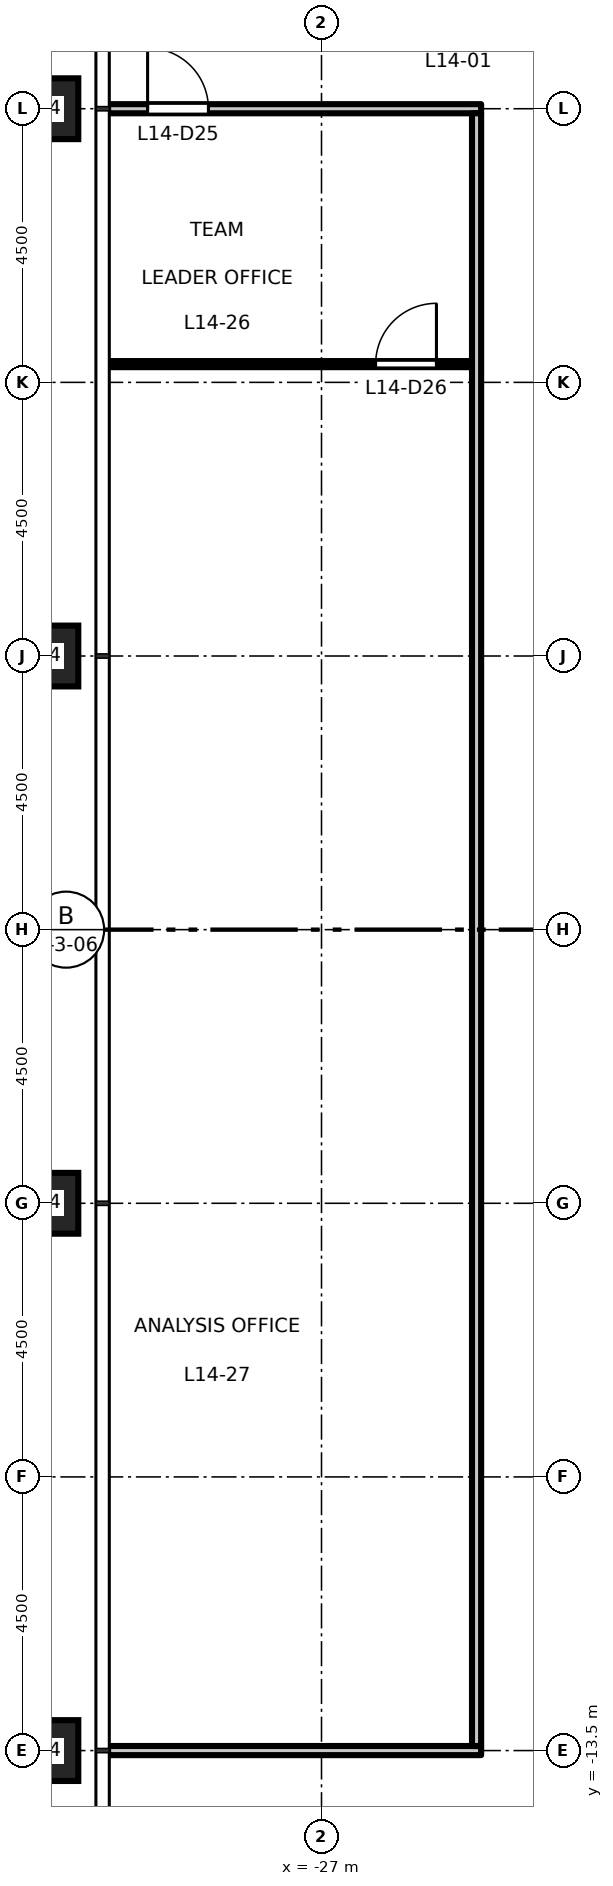
"""IFC4 building model, lengths in metres.
Left out: names, types, materials, properties, quantities, classifications, styles, units other than length and angle.
Written with IfcOpenShell. Run it as: python <this file> out.ifc"""

import sys

from ifc_helpers import new_model, si_unit, direction, frame, frame_2d, origin, origin_2d, place, context, subcontext, project, spatial, rectangle, hollow_rectangle, extrude, element, fill, save


model = new_model("IFC4")
c1 = context("Model", 3, precision=1e-05, world=origin(), true_north=direction((0.0, 1.0)))
c2 = subcontext(c1, "Body", "Model", "MODEL_VIEW")
j1 = project(units=[si_unit("LENGTHUNIT", "METRE"), si_unit("PLANEANGLEUNIT", "RADIAN")], contexts=[c1])
p1 = place(None, origin())
s1 = spatial("IfcSite", under=j1, at=p1, CompositionType="ELEMENT")
p2 = place(p1, origin())
s2 = spatial("IfcBuilding", under=s1, at=p2, CompositionType="ELEMENT")
p3 = place(p2, frame((0.0, 0.0, 67.2)))
s3 = spatial("IfcBuildingStorey", under=s2, at=p3, CompositionType="ELEMENT", Elevation=67.2)
for number, where, z_axis, x_axis in (
    (1, (-31.5, 13.5, 0.0), (0.0, 0.0, 1.0), (1.0, 0.0, 0.0)),
    (2, (-31.5, 4.5, 0.0), (0.0, 0.0, 1.0), (1.0, 0.0, 0.0)),
    (3, (-31.5, -4.5, 0.0), (0.0, 0.0, 1.0), (1.0, 0.0, 0.0)),
    (4, (-31.5, -13.5, 0.0), (0.0, 0.0, 1.0), (1.0, 0.0, 0.0)),
):
    element("IfcColumn", number, at=place(p3, frame(where, z_axis=z_axis, x_axis=x_axis)), inside=s3, PredefinedType="COLUMN", context=c2, shape_type="SweptSolid", body=[
        extrude(hollow_rectangle(XDim=1.0, YDim=1.0, WallThickness=0.06, at=origin_2d()), origin(), (0.0, 0.0, 1.0), 4.5),
    ])
p4 = place(p3, frame((-30.51, -13.5, 0.0), z_axis=(0.0, 0.0, 1.0), x_axis=(1.0, 0.0, 0.0)))
e5 = element("IfcWall", 5, at=p4, inside=s3, PredefinedType="PARTITIONING", context=c2, shape_type="SweptSolid", body=[
    extrude(rectangle(XDim=6.135, YDim=0.15, at=frame_2d((3.067, 0.0))), origin(), (0.0, 0.0, 1.0), 3.35),
])
p5 = place(p3, frame((-30.51, 9.3, 0.0), z_axis=(0.0, 0.0, 1.0), x_axis=(1.0, 0.0, 0.0)))
e6 = element("IfcWall", 6, at=p5, inside=s3, PredefinedType="PARTITIONING", context=c2, shape_type="SweptSolid", body=[
    extrude(rectangle(XDim=5.985, YDim=0.1, at=frame_2d((2.993, 0.0))), origin(), (0.0, 0.0, 1.0), 4.35),
])
p6 = place(p5, frame((4.4, 0.0, 0.0)))
e7 = element("IfcOpeningElement", 7, at=p6, cuts=e6, PredefinedType="OPENING", context=c2, shape_type="SweptSolid", body=[
    extrude(rectangle(XDim=1.0, YDim=2.1, at=frame_2d((0.5, 1.05))), frame((0.0, 0.06, 0.0), z_axis=(0.0, -1.0, 0.0), x_axis=(1.0, 0.0, 0.0)), (0.0, 0.0, 1.0), 0.12),
])
p7 = place(p3, frame((-30.51, 13.5, 0.0), z_axis=(0.0, 0.0, 1.0), x_axis=(1.0, 0.0, 0.0)))
e8 = element("IfcWall", 8, at=p7, inside=s3, PredefinedType="PARTITIONING", context=c2, shape_type="SweptSolid", body=[
    extrude(rectangle(XDim=6.135, YDim=0.15, at=frame_2d((3.067, 0.0))), origin(), (0.0, 0.0, 1.0), 3.35),
])
p8 = place(p7, frame((0.65, 0.0, 0.0)))
e9 = element("IfcOpeningElement", 9, at=p8, cuts=e8, PredefinedType="OPENING", context=c2, shape_type="SweptSolid", body=[
    extrude(rectangle(XDim=1.0, YDim=2.1, at=frame_2d((0.5, 1.05))), frame((0.0, 0.085, 0.0), z_axis=(0.0, -1.0, 0.0), x_axis=(1.0, 0.0, 0.0)), (0.0, 0.0, 1.0), 0.17),
])
p9 = place(p3, frame((-24.45, -13.425, 0.0), z_axis=(0.0, 0.0, 1.0), x_axis=(0.0, 1.0, 0.0)))
e10 = element("IfcWall", 10, at=p9, inside=s3, PredefinedType="PARTITIONING", context=c2, shape_type="SweptSolid", body=[
    extrude(rectangle(XDim=26.85, YDim=0.15, at=frame_2d((13.425, 0.0))), origin(), (0.0, 0.0, 1.0), 4.35),
])
p10 = place(p8, origin())
e11 = element("IfcDoor", 11, at=p10, inside=s3, OperationType="SINGLE_SWING_LEFT", PredefinedType="DOOR", context=c2, shape_type="SweptSolid", body=[
    extrude(rectangle(XDim=1.0, YDim=2.1, at=frame_2d((0.5, 1.05))), frame((0.0, 0.025, 0.0), z_axis=(0.0, -1.0, 0.0), x_axis=(1.0, 0.0, 0.0)), (0.0, 0.0, 1.0), 0.05),
])
fill(e9, e11)
p11 = place(p6, origin())
e12 = element("IfcDoor", 12, at=p11, inside=s3, OperationType="SINGLE_SWING_RIGHT", PredefinedType="DOOR", context=c2, shape_type="SweptSolid", body=[
    extrude(rectangle(XDim=1.0, YDim=2.1, at=frame_2d((0.5, 1.05))), frame((0.0, 0.025, 0.0), z_axis=(0.0, -1.0, 0.0), x_axis=(1.0, 0.0, 0.0)), (0.0, 0.0, 1.0), 0.05),
])
fill(e7, e12)
save(model, sys.argv[1])
